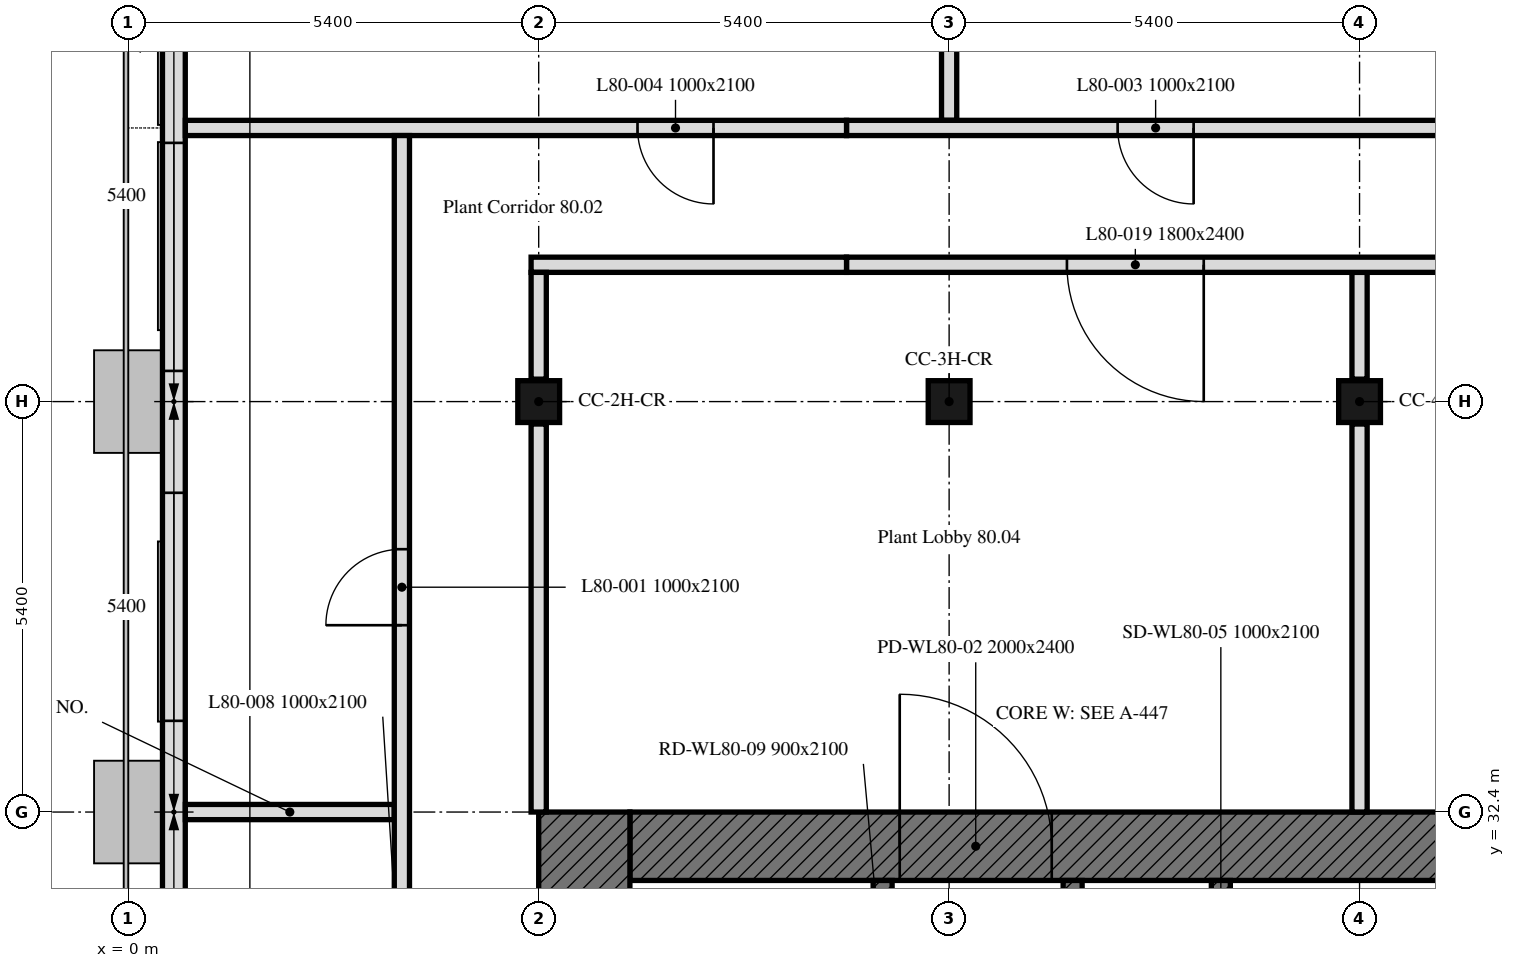
"""IFC4 building model, lengths in metres.
Left out: names, types, materials, properties, quantities, classifications, styles, units other than length and angle.
Written with IfcOpenShell. Run it as: python <this file> out.ifc"""

import sys

from ifc_helpers import new_model, si_unit, direction, frame, frame_2d, origin, origin_2d, place, context, subcontext, project, spatial, polyline, rectangle, outline, extrude, element, fill, save


model = new_model("IFC4")
c1 = context("Model", 3, precision=1e-05, world=origin(), true_north=direction((0.0, 1.0)))
c2 = subcontext(c1, "Body", "Model", "MODEL_VIEW")
j1 = project(units=[si_unit("LENGTHUNIT", "METRE"), si_unit("PLANEANGLEUNIT", "RADIAN")], contexts=[c1])
p1 = place(None, origin())
s1 = spatial("IfcSite", under=j1, at=p1, CompositionType="ELEMENT")
p2 = place(p1, origin())
s2 = spatial("IfcBuilding", under=s1, at=p2, CompositionType="ELEMENT")
p3 = place(p2, frame((0.0, 0.0, 321.7)))
s3 = spatial("IfcBuildingStorey", under=s2, at=p3, CompositionType="ELEMENT", Elevation=321.7)
for number, where, z_axis, x_axis in (
    (1, (5.4, 37.8, 0.0), (0.0, 0.0, 1.0), (1.0, 0.0, 0.0)),
    (2, (10.8, 37.8, 0.0), (0.0, 0.0, 1.0), (1.0, 0.0, 0.0)),
    (3, (16.2, 37.8, 0.0), (0.0, 0.0, 1.0), (1.0, 0.0, 0.0)),
):
    element("IfcColumn", number, at=place(p3, frame(where, z_axis=z_axis, x_axis=x_axis)), inside=s3, PredefinedType="COLUMN", context=c2, shape_type="SweptSolid", body=[
        extrude(rectangle(XDim=0.55, YDim=0.55, at=origin_2d()), origin(), (0.0, 0.0, 1.0), 4.2),
    ])
p4 = place(p3, frame((0.6, 43.014, 0.0), z_axis=(0.0, 0.0, 1.0), x_axis=(0.0, -1.0, 0.0)))
e4 = element("IfcWall", 4, at=p4, inside=s3, PredefinedType="SOLIDWALL", context=c2, shape_type="SweptSolid", body=[
    extrude(outline(polyline([(0.0, 0.0), (32.027, 0.0), (32.027, 3.267), (31.434, 3.267), (30.841, 3.267), (30.248, 3.267), (29.655, 3.267), (29.062, 3.267), (28.469, 3.267), (27.875, 3.267), (27.282, 3.267), (26.689, 3.267), (26.096, 3.267), (25.503, 3.267), (24.91, 3.267), (24.317, 3.267), (23.724, 3.267), (23.131, 3.267), (22.538, 3.267), (21.945, 3.267), (21.352, 3.267), (20.758, 3.267), (20.165, 3.267), (19.572, 3.267), (18.979, 3.267), (18.386, 3.267), (17.793, 3.267), (17.2, 3.267), (16.607, 3.267), (16.014, 3.267), (15.42, 3.267), (14.827, 3.267), (14.234, 3.267), (13.641, 3.267), (13.048, 3.267), (12.455, 3.267), (11.862, 3.267), (11.269, 3.267), (10.676, 3.267), (10.083, 3.267), (9.49, 3.267), (8.896, 3.267), (8.303, 3.267), (7.71, 3.267), (7.117, 3.267), (6.524, 3.267), (5.931, 3.267), (5.338, 3.267), (4.745, 3.267), (4.152, 3.267), (3.559, 3.267), (2.966, 3.267), (2.372, 3.267), (1.779, 3.267), (1.186, 3.267), (0.593, 3.267), (0.0, 3.267), (0.0, 0.0)])), frame((0.0, 0.15, 0.0), z_axis=(0.0, -1.0, 0.0), x_axis=(1.0, 0.0, 0.0)), (0.0, 0.0, 1.0), 0.3),
])
p5 = place(p4, frame((1.81, 0.0, 0.6)))
e5 = element("IfcOpeningElement", 5, at=p5, cuts=e4, PredefinedType="OPENING", context=c2, shape_type="SweptSolid", body=[
    extrude(rectangle(XDim=3.0, YDim=1.8, at=frame_2d((1.5, 0.9))), frame((0.0, 0.16, 0.0), z_axis=(0.0, -1.0, 0.0), x_axis=(1.0, 0.0, 0.0)), (0.0, 0.0, 1.0), 0.32),
])
p6 = place(p4, frame((6.414, 0.0, 0.6)))
e6 = element("IfcOpeningElement", 6, at=p6, cuts=e4, PredefinedType="OPENING", context=c2, shape_type="SweptSolid", body=[
    extrude(rectangle(XDim=3.0, YDim=1.8, at=frame_2d((1.5, 0.9))), frame((0.0, 0.16, 0.0), z_axis=(0.0, -1.0, 0.0), x_axis=(1.0, 0.0, 0.0)), (0.0, 0.0, 1.0), 0.32),
])
p7 = place(p4, frame((11.814, 0.0, 0.6)))
e7 = element("IfcOpeningElement", 7, at=p7, cuts=e4, PredefinedType="OPENING", context=c2, shape_type="SweptSolid", body=[
    extrude(rectangle(XDim=3.0, YDim=1.8, at=frame_2d((1.5, 0.9))), frame((0.0, 0.16, 0.0), z_axis=(0.0, -1.0, 0.0), x_axis=(1.0, 0.0, 0.0)), (0.0, 0.0, 1.0), 0.32),
])
p8 = place(p4, frame((17.214, 0.0, 0.6)))
e8 = element("IfcOpeningElement", 8, at=p8, cuts=e4, PredefinedType="OPENING", context=c2, shape_type="SweptSolid", body=[
    extrude(rectangle(XDim=3.0, YDim=1.8, at=frame_2d((1.5, 0.9))), frame((0.0, 0.16, 0.0), z_axis=(0.0, -1.0, 0.0), x_axis=(1.0, 0.0, 0.0)), (0.0, 0.0, 1.0), 0.32),
])
p9 = place(p4, frame((22.614, 0.0, 0.6)))
e9 = element("IfcOpeningElement", 9, at=p9, cuts=e4, PredefinedType="OPENING", context=c2, shape_type="SweptSolid", body=[
    extrude(rectangle(XDim=3.0, YDim=1.8, at=frame_2d((1.5, 0.9))), frame((0.0, 0.16, 0.0), z_axis=(0.0, -1.0, 0.0), x_axis=(1.0, 0.0, 0.0)), (0.0, 0.0, 1.0), 0.32),
])
p10 = place(p4, frame((28.014, 0.0, 0.6)))
e10 = element("IfcOpeningElement", 10, at=p10, cuts=e4, PredefinedType="OPENING", context=c2, shape_type="SweptSolid", body=[
    extrude(rectangle(XDim=3.0, YDim=1.8, at=frame_2d((1.5, 0.9))), frame((0.0, 0.16, 0.0), z_axis=(0.0, -1.0, 0.0), x_axis=(1.0, 0.0, 0.0)), (0.0, 0.0, 1.0), 0.32),
])
p11 = place(p3, frame((6.6, 31.95, 0.0), z_axis=(0.0, 0.0, 1.0), x_axis=(1.0, 0.0, 0.0)))
e11 = element("IfcWall", 11, at=p11, inside=s3, PredefinedType="SOLIDWALL", context=c2, shape_type="SweptSolid", body=[
    extrude(outline(polyline([(0.0, 0.0), (11.1, 0.0), (11.1, 4.2), (0.0, 5.933), (0.0, 0.0)])), frame((0.0, 0.45, 0.0), z_axis=(0.0, -1.0, 0.0), x_axis=(1.0, 0.0, 0.0)), (0.0, 0.0, 1.0), 0.9),
])
p12 = place(p11, frame((3.55, 0.0, 0.0)))
e12 = element("IfcOpeningElement", 12, at=p12, cuts=e11, PredefinedType="OPENING", context=c2, shape_type="SweptSolid", body=[
    extrude(rectangle(XDim=2.0, YDim=2.4, at=frame_2d((1.0, 1.2))), frame((0.0, 0.45, 0.0), z_axis=(0.0, -1.0, 0.0), x_axis=(1.0, 0.0, 0.0)), (0.0, 0.0, 1.0), 0.9),
])
p13 = place(p3, frame((6.0, 16.2, 0.0), z_axis=(0.0, 0.0, 1.0), x_axis=(0.0, 1.0, 0.0)))
e13 = element("IfcWall", 13, at=p13, inside=s3, PredefinedType="SOLIDWALL", context=c2, shape_type="SweptSolid", body=[
    extrude(rectangle(XDim=16.2, YDim=1.2, at=frame_2d((8.1, 0.0))), origin(), (0.0, 0.0, 1.0), 5.667),
])
p14 = place(p3, frame((9.925, 17.1, 0.0), z_axis=(0.0, 0.0, 1.0), x_axis=(0.0, 1.0, 0.0)))
e14 = element("IfcWall", 14, at=p14, inside=s3, PredefinedType="SOLIDWALL", context=c2, shape_type="SweptSolid", body=[
    extrude(rectangle(XDim=14.4, YDim=0.25, at=frame_2d((7.2, 0.0))), origin(), (0.0, 0.0, 1.0), 4.2),
])
p15 = place(p14, frame((4.6, 0.0, 0.0)))
e15 = element("IfcOpeningElement", 15, at=p15, cuts=e14, PredefinedType="OPENING", context=c2, shape_type="SweptSolid", body=[
    extrude(rectangle(XDim=1.0, YDim=2.1, at=frame_2d((0.5, 1.05))), frame((0.0, 0.125, 0.0), z_axis=(0.0, -1.0, 0.0), x_axis=(1.0, 0.0, 0.0)), (0.0, 0.0, 1.0), 0.25),
])
p16 = place(p14, frame((7.062, 0.0, 0.0)))
e16 = element("IfcOpeningElement", 16, at=p16, cuts=e14, PredefinedType="OPENING", context=c2, shape_type="SweptSolid", body=[
    extrude(rectangle(XDim=1.2, YDim=2.1, at=frame_2d((0.6, 1.05))), frame((0.0, 0.125, 0.0), z_axis=(0.0, -1.0, 0.0), x_axis=(1.0, 0.0, 0.0)), (0.0, 0.0, 1.0), 0.25),
])
p17 = place(p14, frame((10.106, 0.0, 0.0)))
e17 = element("IfcOpeningElement", 17, at=p17, cuts=e14, PredefinedType="OPENING", context=c2, shape_type="SweptSolid", body=[
    extrude(rectangle(XDim=0.9, YDim=2.1, at=frame_2d((0.45, 1.05))), frame((0.0, 0.125, 0.0), z_axis=(0.0, -1.0, 0.0), x_axis=(1.0, 0.0, 0.0)), (0.0, 0.0, 1.0), 0.25),
])
p18 = place(p14, frame((12.719, 0.0, 0.0)))
e18 = element("IfcOpeningElement", 18, at=p18, cuts=e14, PredefinedType="OPENING", context=c2, shape_type="SweptSolid", body=[
    extrude(rectangle(XDim=0.9, YDim=2.1, at=frame_2d((0.45, 1.05))), frame((0.0, 0.125, 0.0), z_axis=(0.0, -1.0, 0.0), x_axis=(1.0, 0.0, 0.0)), (0.0, 0.0, 1.0), 0.25),
])
p19 = place(p3, frame((14.375, 17.1, 0.0), z_axis=(0.0, 0.0, 1.0), x_axis=(0.0, 1.0, 0.0)))
e19 = element("IfcWall", 19, at=p19, inside=s3, PredefinedType="SOLIDWALL", context=c2, shape_type="SweptSolid", body=[
    extrude(rectangle(XDim=14.4, YDim=0.25, at=frame_2d((7.2, 0.0))), origin(), (0.0, 0.0, 1.0), 4.2),
])
p20 = place(p19, frame((13.15, 0.0, 0.0)))
e20 = element("IfcOpeningElement", 20, at=p20, cuts=e19, PredefinedType="OPENING", context=c2, shape_type="SweptSolid", body=[
    extrude(rectangle(XDim=1.0, YDim=2.1, at=frame_2d((0.5, 1.05))), frame((0.0, 0.125, 0.0), z_axis=(0.0, -1.0, 0.0), x_axis=(1.0, 0.0, 0.0)), (0.0, 0.0, 1.0), 0.25),
])
p21 = place(p19, frame((0.24, 0.0, 0.0)))
e21 = element("IfcOpeningElement", 21, at=p21, cuts=e19, PredefinedType="OPENING", context=c2, shape_type="SweptSolid", body=[
    extrude(rectangle(XDim=0.9, YDim=2.1, at=frame_2d((0.45, 1.05))), frame((0.0, 0.125, 0.0), z_axis=(0.0, -1.0, 0.0), x_axis=(1.0, 0.0, 0.0)), (0.0, 0.0, 1.0), 0.25),
])
p22 = place(p19, frame((2.74, 0.0, 0.0)))
e22 = element("IfcOpeningElement", 22, at=p22, cuts=e19, PredefinedType="OPENING", context=c2, shape_type="SweptSolid", body=[
    extrude(rectangle(XDim=0.9, YDim=2.1, at=frame_2d((0.45, 1.05))), frame((0.0, 0.125, 0.0), z_axis=(0.0, -1.0, 0.0), x_axis=(1.0, 0.0, 0.0)), (0.0, 0.0, 1.0), 0.25),
])
p23 = place(p19, frame((6.175, 0.0, 0.0)))
e23 = element("IfcOpeningElement", 23, at=p23, cuts=e19, PredefinedType="OPENING", context=c2, shape_type="SweptSolid", body=[
    extrude(rectangle(XDim=0.9, YDim=2.1, at=frame_2d((0.45, 1.05))), frame((0.0, 0.125, 0.0), z_axis=(0.0, -1.0, 0.0), x_axis=(1.0, 0.0, 0.0)), (0.0, 0.0, 1.0), 0.25),
])
p24 = place(p3, frame((12.425, 29.4, 0.0), z_axis=(0.0, 0.0, 1.0), x_axis=(0.0, 1.0, 0.0)))
e24 = element("IfcWall", 24, at=p24, inside=s3, PredefinedType="SOLIDWALL", context=c2, shape_type="SweptSolid", body=[
    extrude(rectangle(XDim=2.1, YDim=0.25, at=frame_2d((1.05, 0.0))), origin(), (0.0, 0.0, 1.0), 4.2),
])
p25 = place(p24, frame((0.5, 0.0, 0.0)))
e25 = element("IfcOpeningElement", 25, at=p25, cuts=e24, PredefinedType="OPENING", context=c2, shape_type="SweptSolid", body=[
    extrude(rectangle(XDim=1.0, YDim=2.1, at=frame_2d((0.5, 1.05))), frame((0.0, 0.125, 0.0), z_axis=(0.0, -1.0, 0.0), x_axis=(1.0, 0.0, 0.0)), (0.0, 0.0, 1.0), 0.25),
])
p26 = place(p3, frame((0.751, 32.4, 0.0), z_axis=(0.0, 0.0, 1.0), x_axis=(1.0, 0.0, 0.0)))
e26 = element("IfcWall", 26, at=p26, inside=s3, PredefinedType="PARTITIONING", context=c2, shape_type="SweptSolid", body=[
    extrude(outline(polyline([(0.0, 0.0), (2.749, 0.0), (2.749, 4.556), (0.0, 3.334), (0.0, 0.0)])), frame((0.0, 0.1, 0.0), z_axis=(0.0, -1.0, 0.0), x_axis=(1.0, 0.0, 0.0)), (0.0, 0.0, 1.0), 0.2),
])
p27 = place(p3, frame((10.8, 42.905, 0.0), z_axis=(0.0, 0.0, 1.0), x_axis=(0.0, -1.0, 0.0)))
e27 = element("IfcWall", 27, at=p27, inside=s3, PredefinedType="PARTITIONING", context=c2, shape_type="SweptSolid", body=[
    extrude(rectangle(XDim=1.405, YDim=0.2, at=frame_2d((0.703, 0.0))), origin(), (0.0, 0.0, 1.0), 3.45),
])
p28 = place(p3, frame((42.449, 41.4, 0.0), z_axis=(0.0, 0.0, 1.0), x_axis=(-1.0, 0.0, 0.0)))
e28 = element("IfcWall", 28, at=p28, inside=s3, PredefinedType="PARTITIONING", context=c2, shape_type="SweptSolid", body=[
    extrude(rectangle(XDim=32.999, YDim=0.2, at=frame_2d((16.5, 0.0))), origin(), (0.0, 0.0, 1.0), 3.45),
])
p29 = place(p28, frame((12.049, 0.0, 0.0)))
e29 = element("IfcOpeningElement", 29, at=p29, cuts=e28, PredefinedType="OPENING", context=c2, shape_type="SweptSolid", body=[
    extrude(rectangle(XDim=1.0, YDim=2.1, at=frame_2d((0.5, 1.05))), frame((0.0, 0.1, 0.0), z_axis=(0.0, -1.0, 0.0), x_axis=(1.0, 0.0, 0.0)), (0.0, 0.0, 1.0), 0.2),
])
p30 = place(p28, frame((28.432, 0.0, 0.0)))
e30 = element("IfcOpeningElement", 30, at=p30, cuts=e28, PredefinedType="OPENING", context=c2, shape_type="SweptSolid", body=[
    extrude(rectangle(XDim=1.0, YDim=2.1, at=frame_2d((0.5, 1.05))), frame((0.0, 0.1, 0.0), z_axis=(0.0, -1.0, 0.0), x_axis=(1.0, 0.0, 0.0)), (0.0, 0.0, 1.0), 0.2),
])
p31 = place(p3, frame((9.45, 41.4, 0.0), z_axis=(0.0, 0.0, 1.0), x_axis=(-1.0, 0.0, 0.0)))
e31 = element("IfcWall", 31, at=p31, inside=s3, PredefinedType="PARTITIONING", context=c2, shape_type="SweptSolid", body=[
    extrude(outline(polyline([(0.0, 0.0), (8.699, 0.0), (8.699, 3.334), (0.0, 4.2), (0.0, 0.0)])), frame((0.0, 0.1, 0.0), z_axis=(0.0, -1.0, 0.0), x_axis=(1.0, 0.0, 0.0)), (0.0, 0.0, 1.0), 0.2),
])
p32 = place(p31, frame((1.75, 0.0, 0.0)))
e32 = element("IfcOpeningElement", 32, at=p32, cuts=e31, PredefinedType="OPENING", context=c2, shape_type="SweptSolid", body=[
    extrude(rectangle(XDim=1.0, YDim=2.1, at=frame_2d((0.5, 1.05))), frame((0.0, 0.1, 0.0), z_axis=(0.0, -1.0, 0.0), x_axis=(1.0, 0.0, 0.0)), (0.0, 0.0, 1.0), 0.2),
])
p33 = place(p3, frame((16.2, 39.5, 0.0), z_axis=(0.0, 0.0, 1.0), x_axis=(0.0, -1.0, 0.0)))
e33 = element("IfcWall", 33, at=p33, inside=s3, PredefinedType="PARTITIONING", context=c2, shape_type="SweptSolid", body=[
    extrude(rectangle(XDim=1.405, YDim=0.2, at=frame_2d((0.703, 0.0))), origin(), (0.0, 0.0, 1.0), 3.45),
])
p34 = place(p3, frame((16.2, 37.505, 0.0), z_axis=(0.0, 0.0, 1.0), x_axis=(0.0, -1.0, 0.0)))
e34 = element("IfcWall", 34, at=p34, inside=s3, PredefinedType="PARTITIONING", context=c2, shape_type="SweptSolid", body=[
    extrude(rectangle(XDim=5.105, YDim=0.2, at=frame_2d((2.552, 0.0))), origin(), (0.0, 0.0, 1.0), 3.45),
])
p35 = place(p3, frame((42.449, 39.6, 0.0), z_axis=(0.0, 0.0, 1.0), x_axis=(-1.0, 0.0, 0.0)))
e35 = element("IfcWall", 35, at=p35, inside=s3, PredefinedType="PARTITIONING", context=c2, shape_type="SweptSolid", body=[
    extrude(rectangle(XDim=32.999, YDim=0.2, at=frame_2d((16.5, 0.0))), origin(), (0.0, 0.0, 1.0), 3.45),
])
p36 = place(p35, frame((12.249, 0.0, 0.0)))
e36 = element("IfcOpeningElement", 36, at=p36, cuts=e35, PredefinedType="OPENING", context=c2, shape_type="SweptSolid", body=[
    extrude(rectangle(XDim=1.0, YDim=2.1, at=frame_2d((0.5, 1.05))), frame((0.0, 0.1, 0.0), z_axis=(0.0, -1.0, 0.0), x_axis=(1.0, 0.0, 0.0)), (0.0, 0.0, 1.0), 0.2),
])
p37 = place(p35, frame((17.649, 0.0, 0.0)))
e37 = element("IfcOpeningElement", 37, at=p37, cuts=e35, PredefinedType="OPENING", context=c2, shape_type="SweptSolid", body=[
    extrude(rectangle(XDim=1.0, YDim=2.1, at=frame_2d((0.5, 1.05))), frame((0.0, 0.1, 0.0), z_axis=(0.0, -1.0, 0.0), x_axis=(1.0, 0.0, 0.0)), (0.0, 0.0, 1.0), 0.2),
])
p38 = place(p35, frame((23.149, 0.0, 0.0)))
e38 = element("IfcOpeningElement", 38, at=p38, cuts=e35, PredefinedType="OPENING", context=c2, shape_type="SweptSolid", body=[
    extrude(rectangle(XDim=0.8, YDim=2.1, at=frame_2d((0.4, 1.05))), frame((0.0, 0.1, 0.0), z_axis=(0.0, -1.0, 0.0), x_axis=(1.0, 0.0, 0.0)), (0.0, 0.0, 1.0), 0.2),
])
p39 = place(p35, frame((1.299, 0.0, 0.0)))
e39 = element("IfcOpeningElement", 39, at=p39, cuts=e35, PredefinedType="OPENING", context=c2, shape_type="SweptSolid", body=[
    extrude(rectangle(XDim=1.8, YDim=2.4, at=frame_2d((0.9, 1.2))), frame((0.0, 0.1, 0.0), z_axis=(0.0, -1.0, 0.0), x_axis=(1.0, 0.0, 0.0)), (0.0, 0.0, 1.0), 0.2),
])
p40 = place(p35, frame((28.299, 0.0, 0.0)))
e40 = element("IfcOpeningElement", 40, at=p40, cuts=e35, PredefinedType="OPENING", context=c2, shape_type="SweptSolid", body=[
    extrude(rectangle(XDim=1.8, YDim=2.4, at=frame_2d((0.9, 1.2))), frame((0.0, 0.1, 0.0), z_axis=(0.0, -1.0, 0.0), x_axis=(1.0, 0.0, 0.0)), (0.0, 0.0, 1.0), 0.2),
])
p41 = place(p3, frame((9.45, 39.6, 0.0), z_axis=(0.0, 0.0, 1.0), x_axis=(-1.0, 0.0, 0.0)))
e41 = element("IfcWall", 41, at=p41, inside=s3, PredefinedType="PARTITIONING", context=c2, shape_type="SweptSolid", body=[
    extrude(outline(polyline([(0.0, 0.0), (4.15, 0.0), (4.15, 5.356), (0.0, 4.2), (0.0, 0.0)])), frame((0.0, 0.1, 0.0), z_axis=(0.0, -1.0, 0.0), x_axis=(1.0, 0.0, 0.0)), (0.0, 0.0, 1.0), 0.2),
])
p42 = place(p3, frame((5.4, 39.5, 0.0), z_axis=(0.0, 0.0, 1.0), x_axis=(0.0, -1.0, 0.0)))
e42 = element("IfcWall", 42, at=p42, inside=s3, PredefinedType="PARTITIONING", context=c2, shape_type="SweptSolid", body=[
    extrude(rectangle(XDim=1.405, YDim=0.2, at=frame_2d((0.703, 0.0))), origin(), (0.0, 0.0, 1.0), 5.4),
])
p43 = place(p3, frame((5.4, 37.505, 0.0), z_axis=(0.0, 0.0, 1.0), x_axis=(0.0, -1.0, 0.0)))
e43 = element("IfcWall", 43, at=p43, inside=s3, PredefinedType="PARTITIONING", context=c2, shape_type="SweptSolid", body=[
    extrude(rectangle(XDim=5.105, YDim=0.2, at=frame_2d((2.552, 0.0))), origin(), (0.0, 0.0, 1.0), 5.4),
])
p44 = place(p3, frame((3.6, 11.35, 0.0), z_axis=(0.0, 0.0, 1.0), x_axis=(0.0, 1.0, 0.0)))
e44 = element("IfcWall", 44, at=p44, inside=s3, PredefinedType="PARTITIONING", context=c2, shape_type="SweptSolid", body=[
    extrude(rectangle(XDim=29.95, YDim=0.2, at=frame_2d((14.975, 0.0))), origin(), (0.0, 0.0, 1.0), 4.6),
])
p45 = place(p44, frame((23.508, 0.0, 0.0)))
e45 = element("IfcOpeningElement", 45, at=p45, cuts=e44, PredefinedType="OPENING", context=c2, shape_type="SweptSolid", body=[
    extrude(rectangle(XDim=1.0, YDim=2.1, at=frame_2d((0.5, 1.05))), frame((0.0, 0.1, 0.0), z_axis=(0.0, -1.0, 0.0), x_axis=(1.0, 0.0, 0.0)), (0.0, 0.0, 1.0), 0.2),
])
p46 = place(p44, frame((17.85, 0.0, 0.0)))
e46 = element("IfcOpeningElement", 46, at=p46, cuts=e44, PredefinedType="OPENING", context=c2, shape_type="SweptSolid", body=[
    extrude(rectangle(XDim=1.0, YDim=2.1, at=frame_2d((0.5, 1.05))), frame((0.0, 0.1, 0.0), z_axis=(0.0, -1.0, 0.0), x_axis=(1.0, 0.0, 0.0)), (0.0, 0.0, 1.0), 0.2),
])
p47 = place(p44, frame((1.875, 0.0, 0.0)))
e47 = element("IfcOpeningElement", 47, at=p47, cuts=e44, PredefinedType="OPENING", context=c2, shape_type="SweptSolid", body=[
    extrude(rectangle(XDim=1.0, YDim=2.1, at=frame_2d((0.5, 1.05))), frame((0.0, 0.1, 0.0), z_axis=(0.0, -1.0, 0.0), x_axis=(1.0, 0.0, 0.0)), (0.0, 0.0, 1.0), 0.2),
])
p48 = place(p44, frame((9.75, 0.0, 0.0)))
e48 = element("IfcOpeningElement", 48, at=p48, cuts=e44, PredefinedType="OPENING", context=c2, shape_type="SweptSolid", body=[
    extrude(rectangle(XDim=1.0, YDim=2.1, at=frame_2d((0.5, 1.05))), frame((0.0, 0.1, 0.0), z_axis=(0.0, -1.0, 0.0), x_axis=(1.0, 0.0, 0.0)), (0.0, 0.0, 1.0), 0.2),
])
p49 = place(p5, origin())
e49 = element("IfcWindow", 49, at=p49, inside=s3, PartitioningType="SINGLE_PANEL", PredefinedType="WINDOW", context=c2, shape_type="SweptSolid", body=[
    extrude(rectangle(XDim=3.0, YDim=1.8, at=frame_2d((1.5, 0.9))), frame((0.0, 0.03, 0.0), z_axis=(0.0, -1.0, 0.0), x_axis=(1.0, 0.0, 0.0)), (0.0, 0.0, 1.0), 0.06),
])
fill(e5, e49)
p50 = place(p6, origin())
e50 = element("IfcWindow", 50, at=p50, inside=s3, PartitioningType="SINGLE_PANEL", PredefinedType="WINDOW", context=c2, shape_type="SweptSolid", body=[
    extrude(rectangle(XDim=3.0, YDim=1.8, at=frame_2d((1.5, 0.9))), frame((0.0, 0.03, 0.0), z_axis=(0.0, -1.0, 0.0), x_axis=(1.0, 0.0, 0.0)), (0.0, 0.0, 1.0), 0.06),
])
fill(e6, e50)
p51 = place(p12, origin())
e51 = element("IfcDoor", 51, at=p51, inside=s3, OperationType="DOUBLE_DOOR_SINGLE_SWING", PredefinedType="DOOR", context=c2, shape_type="SweptSolid", body=[
    extrude(rectangle(XDim=2.0, YDim=2.4, at=frame_2d((1.0, 1.2))), frame((0.0, 0.025, 0.0), z_axis=(0.0, -1.0, 0.0), x_axis=(1.0, 0.0, 0.0)), (0.0, 0.0, 1.0), 0.05),
])
fill(e12, e51)
p52 = place(p45, origin())
e52 = element("IfcDoor", 52, at=p52, inside=s3, OperationType="SINGLE_SWING_RIGHT", PredefinedType="DOOR", context=c2, shape_type="SweptSolid", body=[
    extrude(rectangle(XDim=1.0, YDim=2.1, at=frame_2d((0.5, 1.05))), frame((0.0, 0.025, 0.0), z_axis=(0.0, -1.0, 0.0), x_axis=(1.0, 0.0, 0.0)), (0.0, 0.0, 1.0), 0.05),
])
fill(e45, e52)
p53 = place(p30, origin())
e53 = element("IfcDoor", 53, at=p53, inside=s3, OperationType="SINGLE_SWING_LEFT", PredefinedType="DOOR", context=c2, shape_type="SweptSolid", body=[
    extrude(rectangle(XDim=1.0, YDim=2.1, at=frame_2d((0.5, 1.05))), frame((0.0, 0.025, 0.0), z_axis=(0.0, -1.0, 0.0), x_axis=(1.0, 0.0, 0.0)), (0.0, 0.0, 1.0), 0.05),
])
fill(e30, e53)
p54 = place(p32, origin())
e54 = element("IfcDoor", 54, at=p54, inside=s3, OperationType="SINGLE_SWING_LEFT", PredefinedType="DOOR", context=c2, shape_type="SweptSolid", body=[
    extrude(rectangle(XDim=1.0, YDim=2.1, at=frame_2d((0.5, 1.05))), frame((0.0, 0.025, 0.0), z_axis=(0.0, -1.0, 0.0), x_axis=(1.0, 0.0, 0.0)), (0.0, 0.0, 1.0), 0.05),
])
fill(e32, e54)
p55 = place(p40, origin())
e55 = element("IfcDoor", 55, at=p55, inside=s3, OperationType="DOUBLE_DOOR_SINGLE_SWING", PredefinedType="DOOR", context=c2, shape_type="SweptSolid", body=[
    extrude(rectangle(XDim=1.8, YDim=2.4, at=frame_2d((0.9, 1.2))), frame((0.0, 0.025, 0.0), z_axis=(0.0, -1.0, 0.0), x_axis=(1.0, 0.0, 0.0)), (0.0, 0.0, 1.0), 0.05),
])
fill(e40, e55)
save(model, sys.argv[1])
